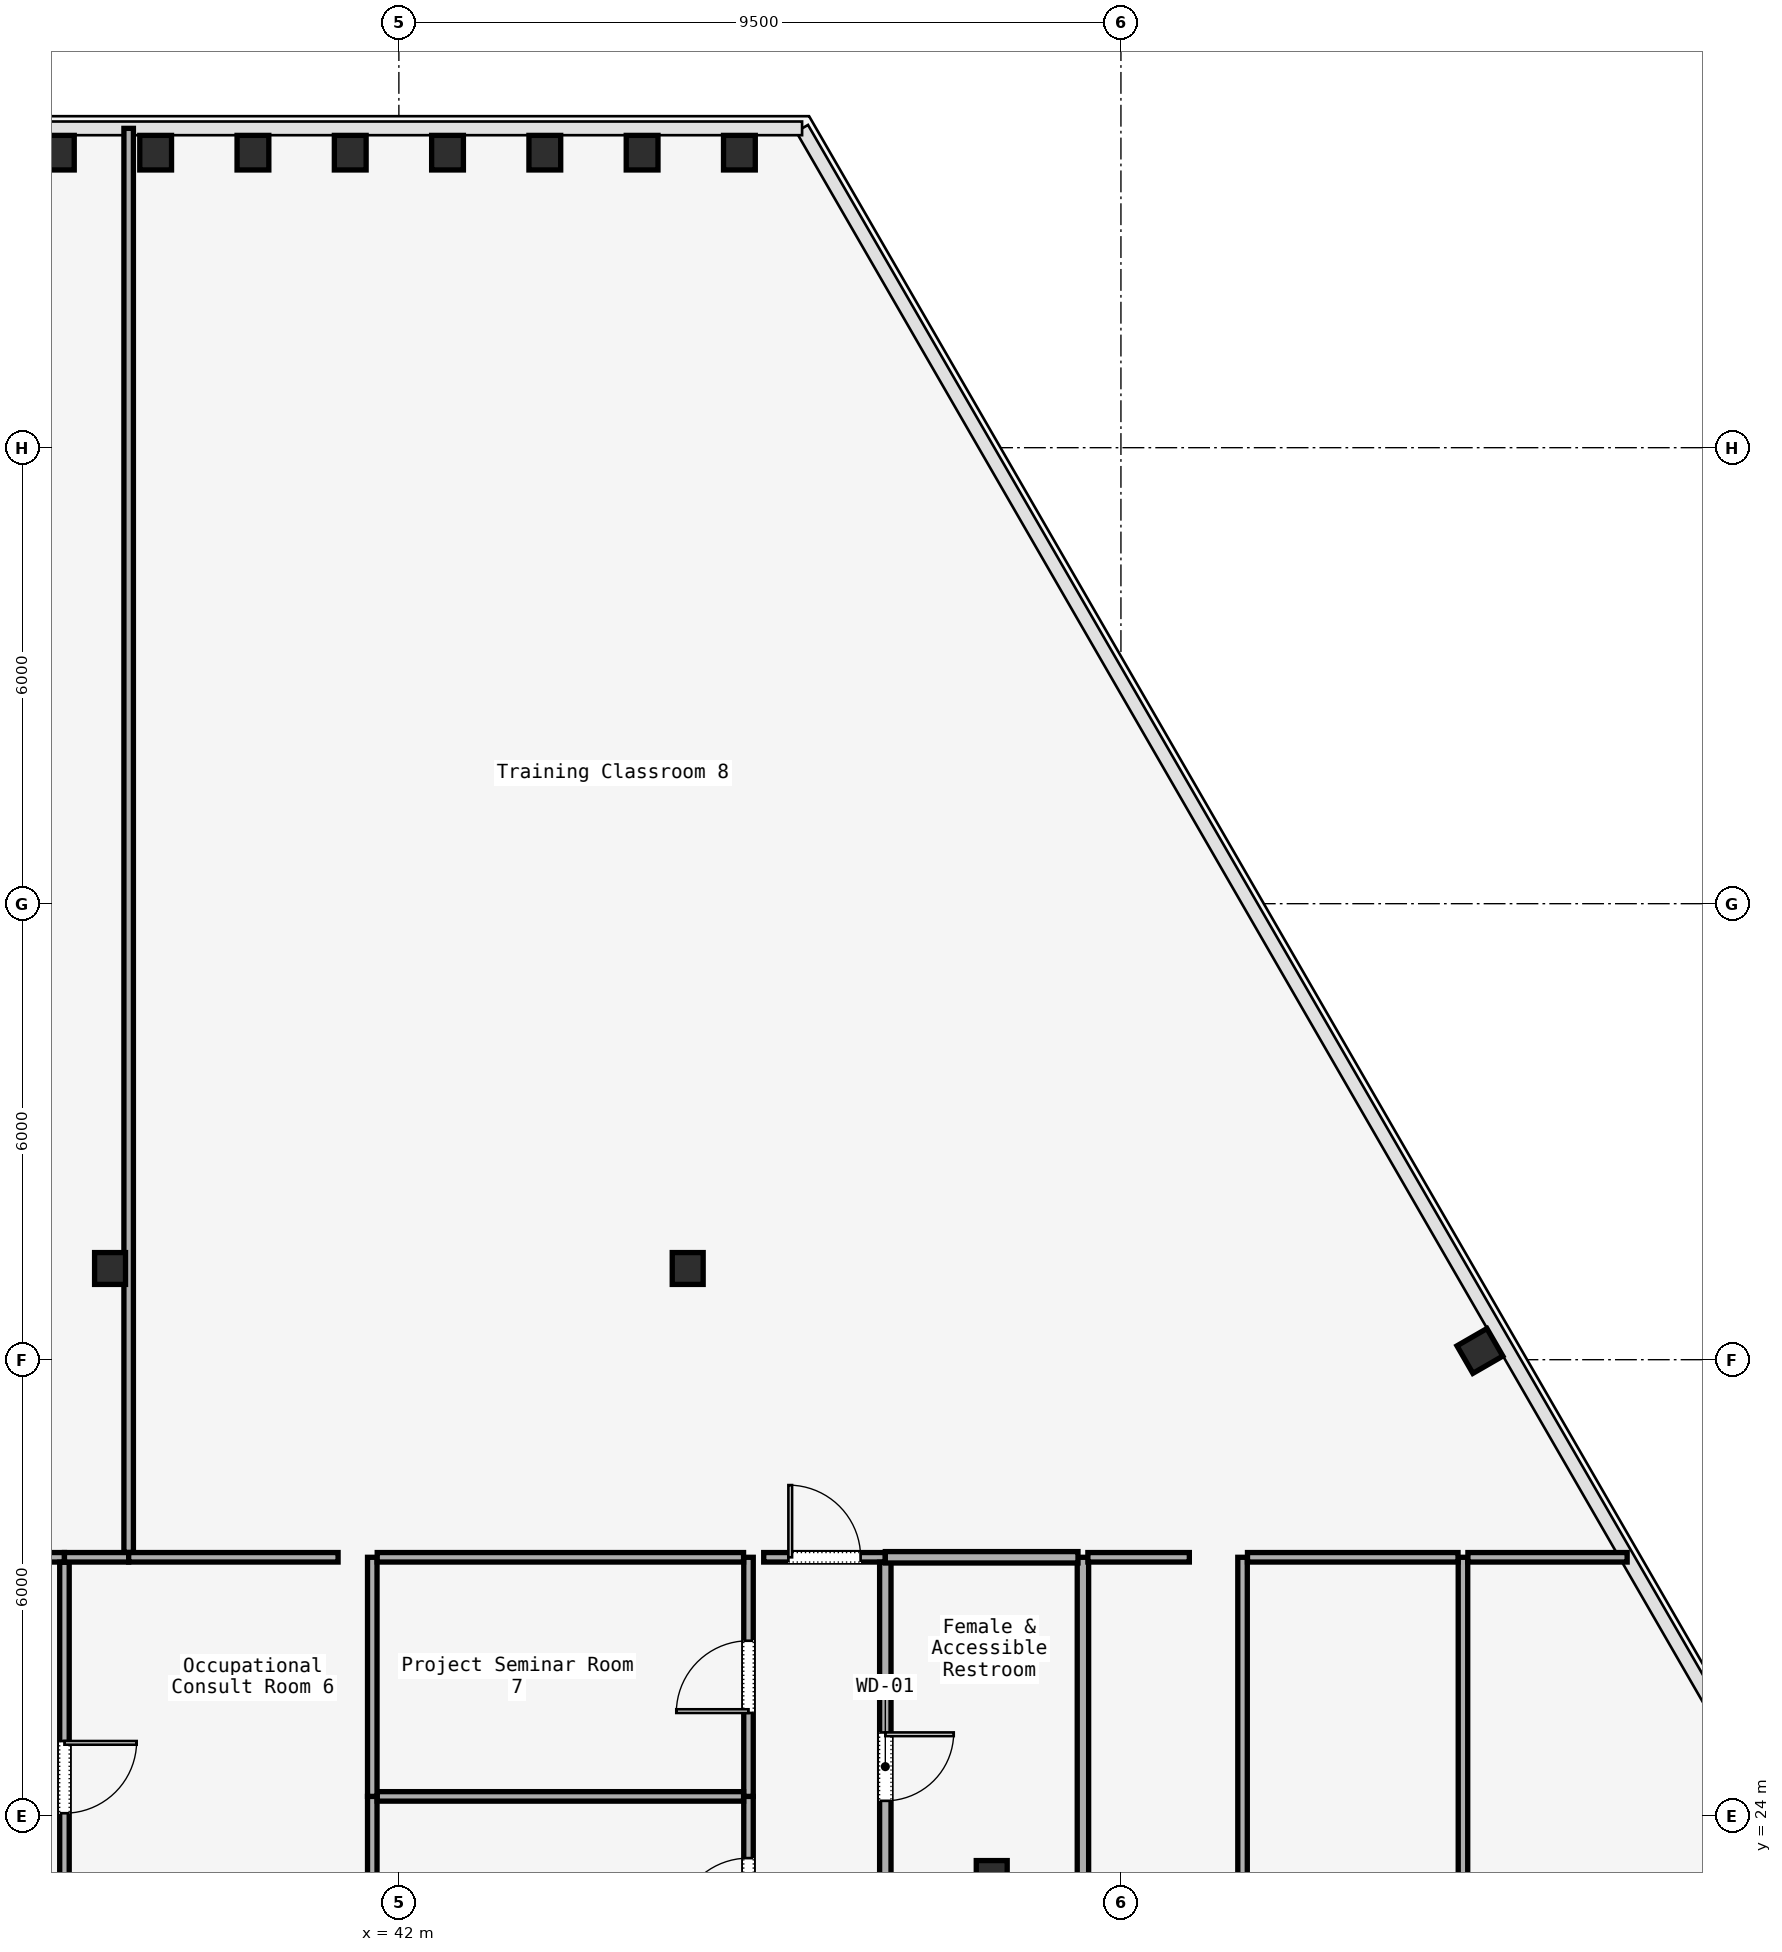
"""IFC4 building model, lengths in metres.
Left out: names, types, materials, properties, quantities, classifications, styles, units other than length and angle.
Written with IfcOpenShell. Run it as: python <this file> out.ifc"""

import sys

from ifc_helpers import new_model, si_unit, direction, frame, frame_2d, origin, origin_2d, place, context, subcontext, project, spatial, rectangle, i_section, extrude, element, fill, save


model = new_model("IFC4")
c1 = context("Model", 3, precision=1e-05, world=origin(), true_north=direction((0.0, 1.0)))
c2 = subcontext(c1, "Body", "Model", "MODEL_VIEW")
j1 = project(units=[si_unit("LENGTHUNIT", "METRE"), si_unit("PLANEANGLEUNIT", "RADIAN")], contexts=[c1])
p1 = place(None, origin())
s1 = spatial("IfcSite", under=j1, at=p1, CompositionType="ELEMENT")
p2 = place(p1, origin())
s2 = spatial("IfcBuilding", under=s1, at=p2, CompositionType="ELEMENT")
p3 = place(p2, frame((0.0, 0.0, 168.8)))
s3 = spatial("IfcBuildingStorey", under=s2, at=p3, CompositionType="ELEMENT", Elevation=168.8)
for number, where, z_axis, x_axis in (
    (1, (49.8, 23.2, 0.0), (0.0, 0.0, 1.0), (1.0, 0.0, 0.0)),
    (2, (38.2, 31.2, 0.0), (0.0, 0.0, 1.0), (1.0, 0.0, 0.0)),
    (3, (45.8, 31.2, 0.0), (0.0, 0.0, 1.0), (1.0, 0.0, 0.0)),
):
    element("IfcColumn", number, at=place(p3, frame(where, z_axis=z_axis, x_axis=x_axis)), inside=s3, PredefinedType="COLUMN", context=c2, shape_type="SweptSolid", body=[
        extrude(i_section(OverallWidth=0.407, OverallDepth=0.419, WebThickness=0.031, FlangeThickness=0.049, FilletRadius=0.015, at=origin_2d()), origin(), (0.0, 0.0, 1.0), 3.58),
    ])
p4 = place(p3, frame((56.223, 30.115, 0.0), z_axis=(-0.036118944898, -0.062578962912, 0.997386231718), x_axis=(-0.001263812759, 0.998039515346, 0.062574184651)))
e4 = element("IfcColumn", 4, at=p4, inside=s3, PredefinedType="COLUMN", context=c2, shape_type="SweptSolid", body=[
    extrude(i_section(OverallWidth=0.418, OverallDepth=0.455, WebThickness=0.042, FlangeThickness=0.052, FilletRadius=0.015, at=origin_2d()), origin(), (0.0, 0.0, 1.0), 3.589),
])
p5 = place(p3, frame((46.48, 45.882, 0.0), z_axis=(-0.06979547813, 0.012993115324, 0.997476701576), x_axis=(-0.183015605797, -0.983110008104, 0.0)))
e5 = element("IfcColumn", 5, at=p5, inside=s3, PredefinedType="COLUMN", context=c2, shape_type="SweptSolid", body=[
    extrude(i_section(OverallWidth=0.418, OverallDepth=0.455, WebThickness=0.042, FlangeThickness=0.052, FilletRadius=0.015, at=origin_2d()), origin(), (0.0, 0.0, 1.0), 3.589),
])
p6 = place(p3, frame((45.2, 45.882, 0.0), z_axis=(-0.049923200694, 0.013008637561, 0.998668338029), x_axis=(-0.25215317949, -0.967687332806, 0.0)))
e6 = element("IfcColumn", 6, at=p6, inside=s3, PredefinedType="COLUMN", context=c2, shape_type="SweptSolid", body=[
    extrude(i_section(OverallWidth=0.418, OverallDepth=0.455, WebThickness=0.042, FlangeThickness=0.052, FilletRadius=0.015, at=origin_2d()), origin(), (0.0, 0.0, 1.0), 3.585),
])
p7 = place(p3, frame((43.92, 45.882, 0.0), z_axis=(-0.02999145884, 0.013019019633, 0.999465365845), x_axis=(-0.39819242053, -0.917301911168, 0.0)))
e7 = element("IfcColumn", 7, at=p7, inside=s3, PredefinedType="COLUMN", context=c2, shape_type="SweptSolid", body=[
    extrude(i_section(OverallWidth=0.418, OverallDepth=0.455, WebThickness=0.042, FlangeThickness=0.052, FilletRadius=0.015, at=origin_2d()), origin(), (0.0, 0.0, 1.0), 3.582),
])
for number, where, z_axis, x_axis in (
    (8, (42.64, 45.882, 0.0), (-0.01, 0.013, 1.0), (-0.794, -0.607, 0.0)),
    (9, (41.36, 45.882, 0.0), (0.01, 0.013, 1.0), (-0.794, 0.607, 0.0)),
):
    element("IfcColumn", number, at=place(p3, frame(where, z_axis=z_axis, x_axis=x_axis)), inside=s3, PredefinedType="COLUMN", context=c2, shape_type="SweptSolid", body=[
        extrude(i_section(OverallWidth=0.418, OverallDepth=0.455, WebThickness=0.042, FlangeThickness=0.052, FilletRadius=0.015, at=origin_2d()), origin(), (0.0, 0.0, 1.0), 3.58),
    ])
p8 = place(p3, frame((40.08, 45.882, 0.0), z_axis=(0.02999145884, 0.013019019633, 0.999465365845), x_axis=(-0.39819242053, 0.917301911168, 0.0)))
e10 = element("IfcColumn", 10, at=p8, inside=s3, PredefinedType="COLUMN", context=c2, shape_type="SweptSolid", body=[
    extrude(i_section(OverallWidth=0.418, OverallDepth=0.455, WebThickness=0.042, FlangeThickness=0.052, FilletRadius=0.015, at=origin_2d()), origin(), (0.0, 0.0, 1.0), 3.582),
])
p9 = place(p3, frame((38.8, 45.882, 0.0), z_axis=(0.049923200694, 0.013008637561, 0.998668338029), x_axis=(-0.25215317949, 0.967687332806, 0.0)))
e11 = element("IfcColumn", 11, at=p9, inside=s3, PredefinedType="COLUMN", context=c2, shape_type="SweptSolid", body=[
    extrude(i_section(OverallWidth=0.418, OverallDepth=0.455, WebThickness=0.042, FlangeThickness=0.052, FilletRadius=0.015, at=origin_2d()), origin(), (0.0, 0.0, 1.0), 3.585),
])
p10 = place(p3, frame((37.52, 45.882, 0.0), z_axis=(0.06979547813, 0.012993115324, 0.997476701576), x_axis=(-0.183015605797, 0.983110008104, 0.0)))
e12 = element("IfcColumn", 12, at=p10, inside=s3, PredefinedType="COLUMN", context=c2, shape_type="SweptSolid", body=[
    extrude(i_section(OverallWidth=0.418, OverallDepth=0.455, WebThickness=0.042, FlangeThickness=0.052, FilletRadius=0.015, at=origin_2d()), origin(), (0.0, 0.0, 1.0), 3.589),
])
p11 = place(p3, frame((35.865, 27.4, 0.0), z_axis=(0.0, 0.0, 1.0), x_axis=(1.0, 0.0, 0.0)))
e13 = element("IfcWall", 13, at=p11, inside=s3, PredefinedType="PARTITIONING", context=c2, shape_type="SweptSolid", body=[
    extrude(rectangle(XDim=1.735, YDim=0.125, at=frame_2d((0.868, 0.0))), origin(), (0.0, 0.0, 1.0), 3.01),
])
p12 = place(p11, frame((0.393, 0.0, 0.0)))
e14 = element("IfcOpeningElement", 14, at=p12, cuts=e13, PredefinedType="OPENING", context=c2, shape_type="SweptSolid", body=[
    extrude(rectangle(XDim=0.95, YDim=2.2, at=frame_2d((0.475, 1.1))), frame((0.0, 0.062, 0.0), z_axis=(0.0, -1.0, 0.0), x_axis=(1.0, 0.0, 0.0)), (0.0, 0.0, 1.0), 0.125),
])
p13 = place(p3, frame((37.6, 27.335, 0.0), z_axis=(0.0, 0.0, 1.0), x_axis=(0.0, -1.0, 0.0)))
e15 = element("IfcWall", 15, at=p13, inside=s3, PredefinedType="PARTITIONING", context=c2, shape_type="SweptSolid", body=[
    extrude(rectangle(XDim=5.655, YDim=0.125, at=frame_2d((2.828, 0.0))), origin(), (0.0, 0.0, 1.0), 3.01),
])
p14 = place(p13, frame((2.353, 0.0, 0.0)))
e16 = element("IfcOpeningElement", 16, at=p14, cuts=e15, PredefinedType="OPENING", context=c2, shape_type="SweptSolid", body=[
    extrude(rectangle(XDim=0.95, YDim=2.2, at=frame_2d((0.475, 1.1))), frame((0.0, 0.062, 0.0), z_axis=(0.0, -1.0, 0.0), x_axis=(1.0, 0.0, 0.0)), (0.0, 0.0, 1.0), 0.125),
])
p15 = place(p3, frame((46.6, 21.68, 0.0), z_axis=(0.0, 0.0, 1.0), x_axis=(0.0, 1.0, 0.0)))
e17 = element("IfcWall", 17, at=p15, inside=s3, PredefinedType="PARTITIONING", context=c2, shape_type="SweptSolid", body=[
    extrude(rectangle(XDim=2.574, YDim=0.125, at=frame_2d((1.287, 0.0))), origin(), (0.0, 0.0, 1.0), 3.01),
])
p16 = place(p15, frame((0.812, 0.0, 0.0)))
e18 = element("IfcOpeningElement", 18, at=p16, cuts=e17, PredefinedType="OPENING", context=c2, shape_type="SweptSolid", body=[
    extrude(rectangle(XDim=0.95, YDim=2.2, at=frame_2d((0.475, 1.1))), frame((0.0, 0.062, 0.0), z_axis=(0.0, -1.0, 0.0), x_axis=(1.0, 0.0, 0.0)), (0.0, 0.0, 1.0), 0.125),
])
p17 = place(p3, frame((46.6, 24.254, 0.0), z_axis=(0.0, 0.0, 1.0), x_axis=(0.0, 1.0, 0.0)))
e19 = element("IfcWall", 19, at=p17, inside=s3, PredefinedType="PARTITIONING", context=c2, shape_type="SweptSolid", body=[
    extrude(rectangle(XDim=3.146, YDim=0.125, at=frame_2d((1.573, 0.0))), origin(), (0.0, 0.0, 1.0), 3.01),
])
p18 = place(p17, frame((1.098, 0.0, 0.0)))
e20 = element("IfcOpeningElement", 20, at=p18, cuts=e19, PredefinedType="OPENING", context=c2, shape_type="SweptSolid", body=[
    extrude(rectangle(XDim=0.95, YDim=2.2, at=frame_2d((0.475, 1.1))), frame((0.0, 0.062, 0.0), z_axis=(0.0, -1.0, 0.0), x_axis=(1.0, 0.0, 0.0)), (0.0, 0.0, 1.0), 0.125),
])
p19 = place(p3, frame((46.8, 27.4, 0.0), z_axis=(0.0, 0.0, 1.0), x_axis=(1.0, 0.0, 0.0)))
e21 = element("IfcWall", 21, at=p19, inside=s3, PredefinedType="PARTITIONING", context=c2, shape_type="SweptSolid", body=[
    extrude(rectangle(XDim=1.6, YDim=0.125, at=frame_2d((0.8, 0.0))), origin(), (0.0, 0.0, 1.0), 3.01),
])
p20 = place(p19, frame((0.325, 0.0, 0.0)))
e22 = element("IfcOpeningElement", 22, at=p20, cuts=e21, PredefinedType="OPENING", context=c2, shape_type="SweptSolid", body=[
    extrude(rectangle(XDim=0.95, YDim=2.2, at=frame_2d((0.475, 1.1))), frame((0.0, 0.062, 0.0), z_axis=(0.0, -1.0, 0.0), x_axis=(1.0, 0.0, 0.0)), (0.0, 0.0, 1.0), 0.125),
])
p21 = place(p3, frame((48.4, 27.335, 0.0), z_axis=(0.0, 0.0, 1.0), x_axis=(0.0, -1.0, 0.0)))
e23 = element("IfcWall", 23, at=p21, inside=s3, PredefinedType="PARTITIONING", context=c2, shape_type="SweptSolid", body=[
    extrude(rectangle(XDim=6.279, YDim=0.15, at=frame_2d((3.14, 0.0))), origin(), (0.0, 0.0, 1.0), 3.01),
])
p22 = place(p21, frame((2.24, 0.0, 0.0)))
e24 = element("IfcOpeningElement", 24, at=p22, cuts=e23, PredefinedType="OPENING", context=c2, shape_type="SweptSolid", body=[
    extrude(rectangle(XDim=0.9, YDim=2.15, at=frame_2d((0.45, 1.075))), frame((0.0, 0.075, 0.0), z_axis=(0.0, -1.0, 0.0), x_axis=(1.0, 0.0, 0.0)), (0.0, 0.0, 1.0), 0.15),
])
p23 = place(p3, frame((56.0, 17.065, 0.0), z_axis=(0.0, 0.0, 1.0), x_axis=(0.0, 1.0, 0.0)))
e25 = element("IfcWall", 25, at=p23, inside=s3, PredefinedType="PARTITIONING", context=c2, shape_type="SweptSolid", body=[
    extrude(rectangle(XDim=10.335, YDim=0.125, at=frame_2d((5.167, 0.0))), origin(), (0.0, 0.0, 1.0), 3.01),
])
p24 = place(p3, frame((56.065, 27.4, 0.0), z_axis=(0.0, 0.0, 1.0), x_axis=(1.0, 0.0, 0.0)))
e26 = element("IfcWall", 26, at=p24, inside=s3, PredefinedType="PARTITIONING", context=c2, shape_type="SweptSolid", body=[
    extrude(rectangle(XDim=2.095, YDim=0.125, at=frame_2d((1.048, 0.0))), origin(), (0.0, 0.0, 1.0), 3.01),
])
p25 = place(p3, frame((51.0, 21.121, 0.0), z_axis=(0.0, 0.0, 1.0), x_axis=(0.0, 1.0, 0.0)))
e27 = element("IfcWall", 27, at=p25, inside=s3, PredefinedType="PARTITIONING", context=c2, shape_type="SweptSolid", body=[
    extrude(rectangle(XDim=6.279, YDim=0.15, at=frame_2d((3.139, 0.0))), origin(), (0.0, 0.0, 1.0), 3.01),
])
p26 = place(p3, frame((51.065, 27.4, 0.0), z_axis=(0.0, 0.0, 1.0), x_axis=(1.0, 0.0, 0.0)))
e28 = element("IfcWall", 28, at=p26, inside=s3, PredefinedType="PARTITIONING", context=c2, shape_type="SweptSolid", body=[
    extrude(rectangle(XDim=1.335, YDim=0.125, at=frame_2d((0.667, 0.0))), origin(), (0.0, 0.0, 1.0), 3.01),
])
p27 = place(p3, frame((53.1, 27.4, 0.0), z_axis=(0.0, 0.0, 1.0), x_axis=(0.0, -1.0, 0.0)))
e29 = element("IfcWall", 29, at=p27, inside=s3, PredefinedType="PARTITIONING", context=c2, shape_type="SweptSolid", body=[
    extrude(rectangle(XDim=10.335, YDim=0.125, at=frame_2d((5.167, 0.0))), origin(), (0.0, 0.0, 1.0), 3.01),
])
p28 = place(p3, frame((53.165, 27.4, 0.0), z_axis=(0.0, 0.0, 1.0), x_axis=(1.0, 0.0, 0.0)))
e30 = element("IfcWall", 30, at=p28, inside=s3, PredefinedType="PARTITIONING", context=c2, shape_type="SweptSolid", body=[
    extrude(rectangle(XDim=2.77, YDim=0.125, at=frame_2d((1.385, 0.0))), origin(), (0.0, 0.0, 1.0), 3.01),
])
p29 = place(p3, frame((41.65, 21.68, 0.0), z_axis=(0.0, 0.0, 1.0), x_axis=(0.0, 1.0, 0.0)))
e31 = element("IfcWall", 31, at=p29, inside=s3, PredefinedType="PARTITIONING", context=c2, shape_type="SweptSolid", body=[
    extrude(rectangle(XDim=2.574, YDim=0.125, at=frame_2d((1.287, 0.0))), origin(), (0.0, 0.0, 1.0), 3.01),
])
p30 = place(p3, frame((41.715, 24.254, 0.0), z_axis=(0.0, 0.0, 1.0), x_axis=(1.0, 0.0, 0.0)))
e32 = element("IfcWall", 32, at=p30, inside=s3, PredefinedType="PARTITIONING", context=c2, shape_type="SweptSolid", body=[
    extrude(rectangle(XDim=4.82, YDim=0.125, at=frame_2d((2.41, 0.0))), origin(), (0.0, 0.0, 1.0), 3.01),
])
p31 = place(p3, frame((48.4, 27.4, 0.0), z_axis=(0.0, 0.0, 1.0), x_axis=(1.0, 0.0, 0.0)))
e33 = element("IfcWall", 33, at=p31, inside=s3, PredefinedType="PARTITIONING", context=c2, shape_type="SweptSolid", body=[
    extrude(rectangle(XDim=2.535, YDim=0.15, at=frame_2d((1.268, 0.0))), origin(), (0.0, 0.0, 1.0), 3.01),
])
p32 = place(p3, frame((41.65, 27.4, 0.0), z_axis=(0.0, 0.0, 1.0), x_axis=(0.0, -1.0, 0.0)))
e34 = element("IfcWall", 34, at=p32, inside=s3, PredefinedType="PARTITIONING", context=c2, shape_type="SweptSolid", body=[
    extrude(rectangle(XDim=3.146, YDim=0.125, at=frame_2d((1.573, 0.0))), origin(), (0.0, 0.0, 1.0), 3.01),
])
p33 = place(p3, frame((37.6, 27.4, 0.0), z_axis=(0.0, 0.0, 1.0), x_axis=(1.0, 0.0, 0.0)))
e35 = element("IfcWall", 35, at=p33, inside=s3, PredefinedType="PARTITIONING", context=c2, shape_type="SweptSolid", body=[
    extrude(rectangle(XDim=0.845, YDim=0.125, at=frame_2d((0.422, 0.0))), origin(), (0.0, 0.0, 1.0), 3.01),
])
p34 = place(p3, frame((38.445, 27.4, 0.0), z_axis=(0.0, 0.0, 1.0), x_axis=(1.0, 0.0, 0.0)))
e36 = element("IfcWall", 36, at=p34, inside=s3, PredefinedType="PARTITIONING", context=c2, shape_type="SweptSolid", body=[
    extrude(rectangle(XDim=2.755, YDim=0.125, at=frame_2d((1.377, 0.0))), origin(), (0.0, 0.0, 1.0), 3.01),
])
p35 = place(p3, frame((41.715, 27.4, 0.0), z_axis=(0.0, 0.0, 1.0), x_axis=(1.0, 0.0, 0.0)))
e37 = element("IfcWall", 37, at=p35, inside=s3, PredefinedType="PARTITIONING", context=c2, shape_type="SweptSolid", body=[
    extrude(rectangle(XDim=4.82, YDim=0.125, at=frame_2d((2.41, 0.0))), origin(), (0.0, 0.0, 1.0), 3.01),
])
p36 = place(p3, frame((38.445, 46.202, 0.0), z_axis=(0.0, 0.0, 1.0), x_axis=(0.0, -1.0, 0.0)))
e38 = element("IfcWall", 38, at=p36, inside=s3, PredefinedType="PARTITIONING", context=c2, shape_type="SweptSolid", body=[
    extrude(rectangle(XDim=18.737, YDim=0.125, at=frame_2d((9.368, 0.0))), origin(), (0.0, 0.0, 1.0), 3.01),
])
p37 = place(p16, origin())
e39 = element("IfcDoor", 39, at=p37, inside=s3, OperationType="SINGLE_SWING_LEFT", PredefinedType="DOOR", context=c2, shape_type="SweptSolid", body=[
    extrude(rectangle(XDim=0.95, YDim=2.2, at=frame_2d((0.475, 1.1))), frame((0.0, 0.025, 0.0), z_axis=(0.0, -1.0, 0.0), x_axis=(1.0, 0.0, 0.0)), (0.0, 0.0, 1.0), 0.05),
])
fill(e18, e39)
p38 = place(p22, origin())
e40 = element("IfcDoor", 40, at=p38, inside=s3, OperationType="SINGLE_SWING_RIGHT", PredefinedType="DOOR", context=c2, shape_type="SweptSolid", body=[
    extrude(rectangle(XDim=0.9, YDim=2.15, at=frame_2d((0.45, 1.075))), frame((0.0, 0.025, 0.0), z_axis=(0.0, -1.0, 0.0), x_axis=(1.0, 0.0, 0.0)), (0.0, 0.0, 1.0), 0.05),
])
fill(e24, e40)
p39 = place(p14, origin())
e41 = element("IfcDoor", 41, at=p39, inside=s3, OperationType="SINGLE_SWING_RIGHT", PredefinedType="DOOR", context=c2, shape_type="SweptSolid", body=[
    extrude(rectangle(XDim=0.95, YDim=2.2, at=frame_2d((0.475, 1.1))), frame((0.0, 0.025, 0.0), z_axis=(0.0, -1.0, 0.0), x_axis=(1.0, 0.0, 0.0)), (0.0, 0.0, 1.0), 0.05),
])
fill(e16, e41)
p40 = place(p18, origin())
e42 = element("IfcDoor", 42, at=p40, inside=s3, OperationType="SINGLE_SWING_LEFT", PredefinedType="DOOR", context=c2, shape_type="SweptSolid", body=[
    extrude(rectangle(XDim=0.95, YDim=2.2, at=frame_2d((0.475, 1.1))), frame((0.0, 0.025, 0.0), z_axis=(0.0, -1.0, 0.0), x_axis=(1.0, 0.0, 0.0)), (0.0, 0.0, 1.0), 0.05),
])
fill(e20, e42)
p41 = place(p20, origin())
e43 = element("IfcDoor", 43, at=p41, inside=s3, OperationType="SINGLE_SWING_LEFT", PredefinedType="DOOR", context=c2, shape_type="SweptSolid", body=[
    extrude(rectangle(XDim=0.95, YDim=2.2, at=frame_2d((0.475, 1.1))), frame((0.0, 0.025, 0.0), z_axis=(0.0, -1.0, 0.0), x_axis=(1.0, 0.0, 0.0)), (0.0, 0.0, 1.0), 0.05),
])
fill(e22, e43)
save(model, sys.argv[1])
